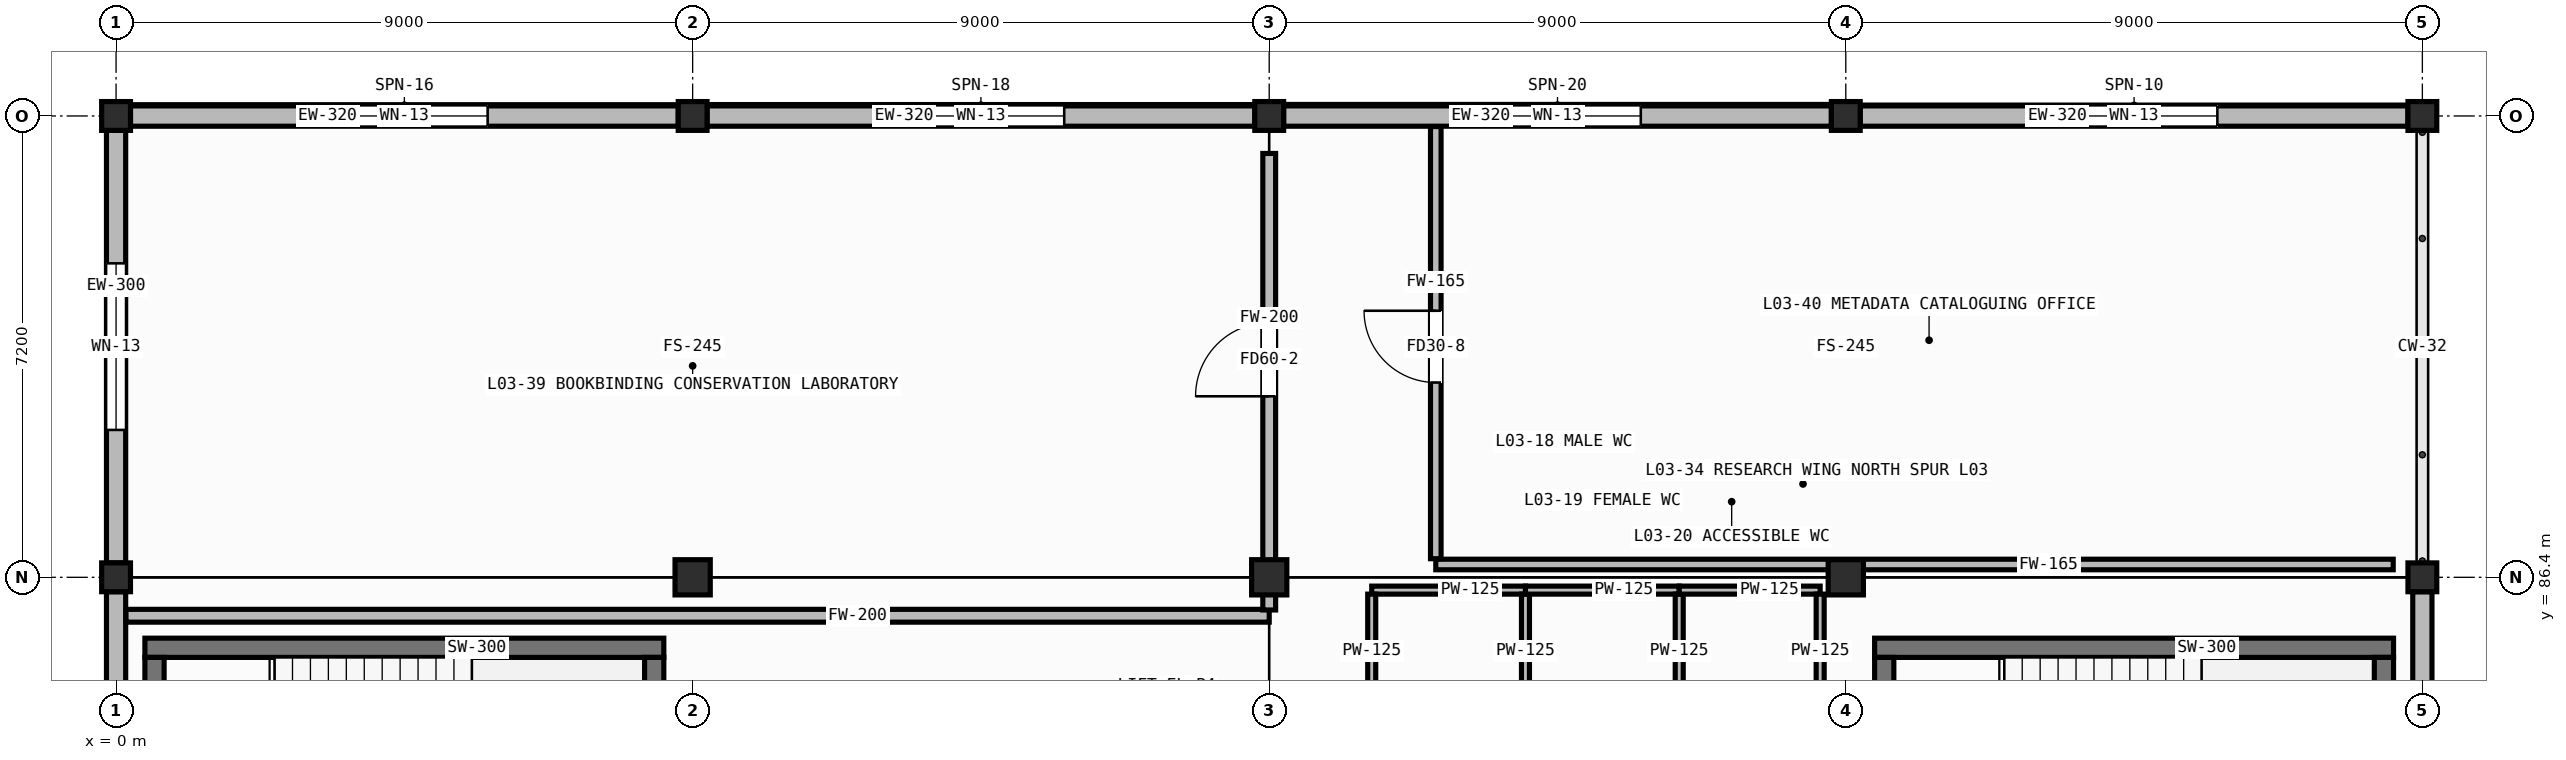
"""IFC4 building model, lengths in metres.
Left out: names, types, materials, properties, quantities, classifications, styles, units other than length and angle.
Written with IfcOpenShell. Run it as: python <this file> out.ifc"""

import sys

from ifc_helpers import new_model, si_unit, direction, frame, frame_2d, origin, origin_2d, place, context, subcontext, project, spatial, rectangle, hollow_rectangle, extrude, element, fill, save


model = new_model("IFC4")
c1 = context("Model", 3, precision=1e-05, world=origin(), true_north=direction((0.0, 1.0)))
c2 = subcontext(c1, "Body", "Model", "MODEL_VIEW")
j1 = project(units=[si_unit("LENGTHUNIT", "METRE"), si_unit("PLANEANGLEUNIT", "RADIAN")], contexts=[c1])
p1 = place(None, origin())
s1 = spatial("IfcSite", under=j1, at=p1, CompositionType="ELEMENT")
p2 = place(p1, origin())
s2 = spatial("IfcBuilding", under=s1, at=p2, CompositionType="ELEMENT")
p3 = place(p2, frame((0.0, 0.0, 8.8)))
s3 = spatial("IfcBuildingStorey", under=s2, at=p3, CompositionType="ELEMENT", Elevation=8.8)
for number, where, z_axis, x_axis in (
    (1, (0.0, 86.4, 0.0), (0.0, 0.0, 1.0), (1.0, 0.0, 0.0)),
    (2, (0.0, 93.6, 0.0), (0.0, 0.0, 1.0), (1.0, 0.0, 0.0)),
):
    element("IfcColumn", number, at=place(p3, frame(where, z_axis=z_axis, x_axis=x_axis)), inside=s3, PredefinedType="COLUMN", context=c2, shape_type="SweptSolid", body=[
        extrude(hollow_rectangle(XDim=0.45, YDim=0.45, WallThickness=0.019, at=origin_2d()), origin(), (0.0, 0.0, 1.0), 4.0),
    ])
p4 = place(p3, frame((9.0, 86.4, 0.0), z_axis=(0.0, 0.0, 1.0), x_axis=(1.0, 0.0, 0.0)))
e3 = element("IfcColumn", 3, at=p4, inside=s3, PredefinedType="COLUMN", context=c2, shape_type="SweptSolid", body=[
    extrude(hollow_rectangle(XDim=0.55, YDim=0.55, WallThickness=0.022, at=origin_2d()), origin(), (0.0, 0.0, 1.0), 4.0),
])
p5 = place(p3, frame((9.0, 93.6, 0.0), z_axis=(0.0, 0.0, 1.0), x_axis=(1.0, 0.0, 0.0)))
e4 = element("IfcColumn", 4, at=p5, inside=s3, PredefinedType="COLUMN", context=c2, shape_type="SweptSolid", body=[
    extrude(hollow_rectangle(XDim=0.45, YDim=0.45, WallThickness=0.019, at=origin_2d()), origin(), (0.0, 0.0, 1.0), 4.0),
])
p6 = place(p3, frame((18.0, 86.4, 0.0), z_axis=(0.0, 0.0, 1.0), x_axis=(1.0, 0.0, 0.0)))
e5 = element("IfcColumn", 5, at=p6, inside=s3, PredefinedType="COLUMN", context=c2, shape_type="SweptSolid", body=[
    extrude(hollow_rectangle(XDim=0.55, YDim=0.55, WallThickness=0.022, at=origin_2d()), origin(), (0.0, 0.0, 1.0), 4.0),
])
p7 = place(p3, frame((18.0, 93.6, 0.0), z_axis=(0.0, 0.0, 1.0), x_axis=(1.0, 0.0, 0.0)))
e6 = element("IfcColumn", 6, at=p7, inside=s3, PredefinedType="COLUMN", context=c2, shape_type="SweptSolid", body=[
    extrude(hollow_rectangle(XDim=0.45, YDim=0.45, WallThickness=0.019, at=origin_2d()), origin(), (0.0, 0.0, 1.0), 4.0),
])
p8 = place(p3, frame((27.0, 86.4, 0.0), z_axis=(0.0, 0.0, 1.0), x_axis=(1.0, 0.0, 0.0)))
e7 = element("IfcColumn", 7, at=p8, inside=s3, PredefinedType="COLUMN", context=c2, shape_type="SweptSolid", body=[
    extrude(hollow_rectangle(XDim=0.55, YDim=0.55, WallThickness=0.022, at=origin_2d()), origin(), (0.0, 0.0, 1.0), 4.0),
])
for number, where, z_axis, x_axis in (
    (8, (27.0, 93.6, 0.0), (0.0, 0.0, 1.0), (1.0, 0.0, 0.0)),
    (9, (36.0, 86.4, 0.0), (0.0, 0.0, 1.0), (1.0, 0.0, 0.0)),
    (10, (36.0, 93.6, 0.0), (0.0, 0.0, 1.0), (1.0, 0.0, 0.0)),
):
    element("IfcColumn", number, at=place(p3, frame(where, z_axis=z_axis, x_axis=x_axis)), inside=s3, PredefinedType="COLUMN", context=c2, shape_type="SweptSolid", body=[
        extrude(hollow_rectangle(XDim=0.45, YDim=0.45, WallThickness=0.019, at=origin_2d()), origin(), (0.0, 0.0, 1.0), 4.0),
    ])
p9 = place(p3, frame((8.775, 93.6, 0.0), z_axis=(0.0, 0.0, 1.0), x_axis=(-1.0, 0.0, 0.0)))
e11 = element("IfcWall", 11, at=p9, inside=s3, PredefinedType="STANDARD", context=c2, shape_type="SweptSolid", body=[
    extrude(rectangle(XDim=8.55, YDim=0.32, at=frame_2d((4.275, 0.0))), origin(), (0.0, 0.0, 1.0), 3.295),
])
p10 = place(p9, frame((2.975, 0.0, 0.85)))
e12 = element("IfcOpeningElement", 12, at=p10, cuts=e11, PredefinedType="OPENING", context=c2, shape_type="SweptSolid", body=[
    extrude(rectangle(XDim=2.6, YDim=1.6, at=frame_2d((1.3, 0.8))), frame((0.0, 0.172, 0.0), z_axis=(0.0, -1.0, 0.0), x_axis=(1.0, 0.0, 0.0)), (0.0, 0.0, 1.0), 0.344),
])
p11 = place(p3, frame((17.775, 93.6, 0.0), z_axis=(0.0, 0.0, 1.0), x_axis=(-1.0, 0.0, 0.0)))
e13 = element("IfcWall", 13, at=p11, inside=s3, PredefinedType="STANDARD", context=c2, shape_type="SweptSolid", body=[
    extrude(rectangle(XDim=8.55, YDim=0.32, at=frame_2d((4.275, 0.0))), origin(), (0.0, 0.0, 1.0), 3.295),
])
p12 = place(p11, frame((2.975, 0.0, 0.85)))
e14 = element("IfcOpeningElement", 14, at=p12, cuts=e13, PredefinedType="OPENING", context=c2, shape_type="SweptSolid", body=[
    extrude(rectangle(XDim=2.6, YDim=1.6, at=frame_2d((1.3, 0.8))), frame((0.0, 0.172, 0.0), z_axis=(0.0, -1.0, 0.0), x_axis=(1.0, 0.0, 0.0)), (0.0, 0.0, 1.0), 0.344),
])
p13 = place(p3, frame((26.775, 93.6, 0.0), z_axis=(0.0, 0.0, 1.0), x_axis=(-1.0, 0.0, 0.0)))
e15 = element("IfcWall", 15, at=p13, inside=s3, PredefinedType="STANDARD", context=c2, shape_type="SweptSolid", body=[
    extrude(rectangle(XDim=8.55, YDim=0.32, at=frame_2d((4.275, 0.0))), origin(), (0.0, 0.0, 1.0), 3.295),
])
p14 = place(p13, frame((2.975, 0.0, 0.85)))
e16 = element("IfcOpeningElement", 16, at=p14, cuts=e15, PredefinedType="OPENING", context=c2, shape_type="SweptSolid", body=[
    extrude(rectangle(XDim=2.6, YDim=1.6, at=frame_2d((1.3, 0.8))), frame((0.0, 0.172, 0.0), z_axis=(0.0, -1.0, 0.0), x_axis=(1.0, 0.0, 0.0)), (0.0, 0.0, 1.0), 0.344),
])
p15 = place(p3, frame((35.775, 93.6, 0.0), z_axis=(0.0, 0.0, 1.0), x_axis=(-1.0, 0.0, 0.0)))
e17 = element("IfcWall", 17, at=p15, inside=s3, PredefinedType="STANDARD", context=c2, shape_type="SweptSolid", body=[
    extrude(rectangle(XDim=8.55, YDim=0.32, at=frame_2d((4.275, 0.0))), origin(), (0.0, 0.0, 1.0), 3.295),
])
p16 = place(p15, frame((2.975, 0.0, 0.85)))
e18 = element("IfcOpeningElement", 18, at=p16, cuts=e17, PredefinedType="OPENING", context=c2, shape_type="SweptSolid", body=[
    extrude(rectangle(XDim=2.6, YDim=1.6, at=frame_2d((1.3, 0.8))), frame((0.0, 0.172, 0.0), z_axis=(0.0, -1.0, 0.0), x_axis=(1.0, 0.0, 0.0)), (0.0, 0.0, 1.0), 0.344),
])
p17 = place(p3, frame((0.0, 79.425, 0.0), z_axis=(0.0, 0.0, 1.0), x_axis=(0.0, 1.0, 0.0)))
e19 = element("IfcWall", 19, at=p17, inside=s3, PredefinedType="STANDARD", context=c2, shape_type="SweptSolid", body=[
    extrude(rectangle(XDim=6.75, YDim=0.3, at=frame_2d((3.375, 0.0))), origin(), (0.0, 0.0, 1.0), 3.295),
])
p18 = place(p3, frame((0.0, 86.625, 0.0), z_axis=(0.0, 0.0, 1.0), x_axis=(0.0, 1.0, 0.0)))
e20 = element("IfcWall", 20, at=p18, inside=s3, PredefinedType="STANDARD", context=c2, shape_type="SweptSolid", body=[
    extrude(rectangle(XDim=6.75, YDim=0.3, at=frame_2d((3.375, 0.0))), origin(), (0.0, 0.0, 1.0), 3.295),
])
p19 = place(p18, frame((2.075, 0.0, 0.85)))
e21 = element("IfcOpeningElement", 21, at=p19, cuts=e20, PredefinedType="OPENING", context=c2, shape_type="SweptSolid", body=[
    extrude(rectangle(XDim=2.6, YDim=1.6, at=frame_2d((1.3, 0.8))), frame((0.0, 0.162, 0.0), z_axis=(0.0, -1.0, 0.0), x_axis=(1.0, 0.0, 0.0)), (0.0, 0.0, 1.0), 0.324),
])
p20 = place(p3, frame((36.0, 86.175, 0.0), z_axis=(0.0, 0.0, 1.0), x_axis=(0.0, -1.0, 0.0)))
e22 = element("IfcWall", 22, at=p20, inside=s3, PredefinedType="STANDARD", context=c2, shape_type="SweptSolid", body=[
    extrude(rectangle(XDim=6.75, YDim=0.3, at=frame_2d((3.375, 0.0))), origin(), (0.0, 0.0, 1.0), 3.295),
])
p21 = place(p3, frame((0.45, 85.3, 0.0), z_axis=(0.0, 0.0, 1.0), x_axis=(1.0, 0.0, 0.0)))
e23 = element("IfcWall", 23, at=p21, inside=s3, PredefinedType="SHEAR", context=c2, shape_type="SweptSolid", body=[
    extrude(rectangle(XDim=8.1, YDim=0.3, at=frame_2d((4.05, 0.0))), origin(), (0.0, 0.0, 1.0), 3.745),
])
for number, where, z_axis, x_axis in (
    (24, (0.6, 81.35, 0.0), (0.0, 0.0, 1.0), (0.0, 1.0, 0.0)),
    (25, (8.4, 81.35, 0.0), (0.0, 0.0, 1.0), (0.0, 1.0, 0.0)),
):
    element("IfcWall", number, at=place(p3, frame(where, z_axis=z_axis, x_axis=x_axis)), inside=s3, PredefinedType="SHEAR", context=c2, shape_type="SweptSolid", body=[
        extrude(rectangle(XDim=3.8, YDim=0.3, at=frame_2d((1.9, 0.0))), origin(), (0.0, 0.0, 1.0), 3.745),
    ])
p22 = place(p3, frame((27.45, 85.3, 0.0), z_axis=(0.0, 0.0, 1.0), x_axis=(1.0, 0.0, 0.0)))
e26 = element("IfcWall", 26, at=p22, inside=s3, PredefinedType="SHEAR", context=c2, shape_type="SweptSolid", body=[
    extrude(rectangle(XDim=8.1, YDim=0.3, at=frame_2d((4.05, 0.0))), origin(), (0.0, 0.0, 1.0), 3.745),
])
for number, where, z_axis, x_axis in (
    (27, (27.6, 81.35, 0.0), (0.0, 0.0, 1.0), (0.0, 1.0, 0.0)),
    (28, (35.4, 81.35, 0.0), (0.0, 0.0, 1.0), (0.0, 1.0, 0.0)),
):
    element("IfcWall", number, at=place(p3, frame(where, z_axis=z_axis, x_axis=x_axis)), inside=s3, PredefinedType="SHEAR", context=c2, shape_type="SweptSolid", body=[
        extrude(rectangle(XDim=3.8, YDim=0.3, at=frame_2d((1.9, 0.0))), origin(), (0.0, 0.0, 1.0), 3.745),
    ])
p23 = place(p3, frame((19.6, 86.2, 0.0), z_axis=(0.0, 0.0, 1.0), x_axis=(1.0, 0.0, 0.0)))
e29 = element("IfcWall", 29, at=p23, inside=s3, PredefinedType="PARTITIONING", context=c2, shape_type="SweptSolid", body=[
    extrude(rectangle(XDim=2.4, YDim=0.125, at=frame_2d((1.2, 0.0))), origin(), (0.0, 0.0, 1.0), 3.025),
])
for number, where, z_axis, x_axis in (
    (30, (19.6, 83.69, 0.0), (0.0, 0.0, 1.0), (0.0, 1.0, 0.0)),
    (31, (22.0, 83.69, 0.0), (0.0, 0.0, 1.0), (0.0, 1.0, 0.0)),
):
    element("IfcWall", number, at=place(p3, frame(where, z_axis=z_axis, x_axis=x_axis)), inside=s3, PredefinedType="PARTITIONING", context=c2, shape_type="SweptSolid", body=[
        extrude(rectangle(XDim=2.448, YDim=0.125, at=frame_2d((1.224, 0.0))), origin(), (0.0, 0.0, 1.0), 3.745),
    ])
p24 = place(p3, frame((22.0, 86.2, 0.0), z_axis=(0.0, 0.0, 1.0), x_axis=(1.0, 0.0, 0.0)))
e32 = element("IfcWall", 32, at=p24, inside=s3, PredefinedType="PARTITIONING", context=c2, shape_type="SweptSolid", body=[
    extrude(rectangle(XDim=2.4, YDim=0.125, at=frame_2d((1.2, 0.0))), origin(), (0.0, 0.0, 1.0), 3.025),
])
p25 = place(p3, frame((24.4, 83.69, 0.0), z_axis=(0.0, 0.0, 1.0), x_axis=(0.0, 1.0, 0.0)))
e33 = element("IfcWall", 33, at=p25, inside=s3, PredefinedType="PARTITIONING", context=c2, shape_type="SweptSolid", body=[
    extrude(rectangle(XDim=2.448, YDim=0.125, at=frame_2d((1.224, 0.0))), origin(), (0.0, 0.0, 1.0), 3.745),
])
p26 = place(p3, frame((24.4, 86.2, 0.0), z_axis=(0.0, 0.0, 1.0), x_axis=(1.0, 0.0, 0.0)))
e34 = element("IfcWall", 34, at=p26, inside=s3, PredefinedType="PARTITIONING", context=c2, shape_type="SweptSolid", body=[
    extrude(rectangle(XDim=2.2, YDim=0.125, at=frame_2d((1.1, 0.0))), origin(), (0.0, 0.0, 1.0), 3.025),
])
p27 = place(p3, frame((26.6, 83.69, 0.0), z_axis=(0.0, 0.0, 1.0), x_axis=(0.0, 1.0, 0.0)))
e35 = element("IfcWall", 35, at=p27, inside=s3, PredefinedType="PARTITIONING", context=c2, shape_type="SweptSolid", body=[
    extrude(rectangle(XDim=2.448, YDim=0.125, at=frame_2d((1.224, 0.0))), origin(), (0.0, 0.0, 1.0), 3.745),
])
p28 = place(p3, frame((0.155, 85.8, 0.0), z_axis=(0.0, 0.0, 1.0), x_axis=(1.0, 0.0, 0.0)))
e36 = element("IfcWall", 36, at=p28, inside=s3, PredefinedType="PARTITIONING", context=c2, shape_type="SweptSolid", body=[
    extrude(rectangle(XDim=17.845, YDim=0.2, at=frame_2d((8.922, 0.0))), origin(), (0.0, 0.0, 1.0), 3.745),
])
p29 = place(p3, frame((18.0, 85.89, 0.0), z_axis=(0.0, 0.0, 1.0), x_axis=(0.0, 1.0, 0.0)))
e37 = element("IfcWall", 37, at=p29, inside=s3, PredefinedType="PARTITIONING", context=c2, shape_type="SweptSolid", body=[
    extrude(rectangle(XDim=7.125, YDim=0.2, at=frame_2d((3.562, 0.0))), origin(), (0.0, 0.0, 1.0), 3.025),
])
p30 = place(p29, frame((3.335, 0.0, 0.0)))
e38 = element("IfcOpeningElement", 38, at=p30, cuts=e37, PredefinedType="OPENING", context=c2, shape_type="SweptSolid", body=[
    extrude(rectangle(XDim=1.15, YDim=2.1, at=frame_2d((0.575, 1.05))), frame((0.0, 0.112, 0.0), z_axis=(0.0, -1.0, 0.0), x_axis=(1.0, 0.0, 0.0)), (0.0, 0.0, 1.0), 0.224),
])
p31 = place(p3, frame((20.6, 86.6, 0.0), z_axis=(0.0, 0.0, 1.0), x_axis=(1.0, 0.0, 0.0)))
e39 = element("IfcWall", 39, at=p31, inside=s3, PredefinedType="PARTITIONING", context=c2, shape_type="SweptSolid", body=[
    extrude(rectangle(XDim=14.945, YDim=0.165, at=frame_2d((7.472, 0.0))), origin(), (0.0, 0.0, 1.0), 3.025),
])
p32 = place(p3, frame((20.6, 86.69, 0.0), z_axis=(0.0, 0.0, 1.0), x_axis=(0.0, 1.0, 0.0)))
e40 = element("IfcWall", 40, at=p32, inside=s3, PredefinedType="PARTITIONING", context=c2, shape_type="SweptSolid", body=[
    extrude(rectangle(XDim=6.745, YDim=0.165, at=frame_2d((3.373, 0.0))), origin(), (0.0, 0.0, 1.0), 3.745),
])
p33 = place(p32, frame((2.75, 0.0, 0.0)))
e41 = element("IfcOpeningElement", 41, at=p33, cuts=e40, PredefinedType="OPENING", context=c2, shape_type="SweptSolid", body=[
    extrude(rectangle(XDim=1.12, YDim=2.08, at=frame_2d((0.56, 1.04))), frame((0.0, 0.094, 0.0), z_axis=(0.0, -1.0, 0.0), x_axis=(1.0, 0.0, 0.0)), (0.0, 0.0, 1.0), 0.189),
])
p34 = place(p10, origin())
e42 = element("IfcWindow", 42, at=p34, inside=s3, PartitioningType="DOUBLE_PANEL_VERTICAL", PredefinedType="WINDOW", context=c2, shape_type="SweptSolid", body=[
    extrude(rectangle(XDim=2.6, YDim=1.6, at=frame_2d((1.3, 0.8))), frame((0.0, 0.03, 0.0), z_axis=(0.0, -1.0, 0.0), x_axis=(1.0, 0.0, 0.0)), (0.0, 0.0, 1.0), 0.06),
])
fill(e12, e42)
p35 = place(p12, origin())
e43 = element("IfcWindow", 43, at=p35, inside=s3, PartitioningType="DOUBLE_PANEL_VERTICAL", PredefinedType="WINDOW", context=c2, shape_type="SweptSolid", body=[
    extrude(rectangle(XDim=2.6, YDim=1.6, at=frame_2d((1.3, 0.8))), frame((0.0, 0.03, 0.0), z_axis=(0.0, -1.0, 0.0), x_axis=(1.0, 0.0, 0.0)), (0.0, 0.0, 1.0), 0.06),
])
fill(e14, e43)
p36 = place(p14, origin())
e44 = element("IfcWindow", 44, at=p36, inside=s3, PartitioningType="DOUBLE_PANEL_VERTICAL", PredefinedType="WINDOW", context=c2, shape_type="SweptSolid", body=[
    extrude(rectangle(XDim=2.6, YDim=1.6, at=frame_2d((1.3, 0.8))), frame((0.0, 0.03, 0.0), z_axis=(0.0, -1.0, 0.0), x_axis=(1.0, 0.0, 0.0)), (0.0, 0.0, 1.0), 0.06),
])
fill(e16, e44)
p37 = place(p16, origin())
e45 = element("IfcWindow", 45, at=p37, inside=s3, PartitioningType="DOUBLE_PANEL_VERTICAL", PredefinedType="WINDOW", context=c2, shape_type="SweptSolid", body=[
    extrude(rectangle(XDim=2.6, YDim=1.6, at=frame_2d((1.3, 0.8))), frame((0.0, 0.03, 0.0), z_axis=(0.0, -1.0, 0.0), x_axis=(1.0, 0.0, 0.0)), (0.0, 0.0, 1.0), 0.06),
])
fill(e18, e45)
p38 = place(p19, origin())
e46 = element("IfcWindow", 46, at=p38, inside=s3, PartitioningType="DOUBLE_PANEL_VERTICAL", PredefinedType="WINDOW", context=c2, shape_type="SweptSolid", body=[
    extrude(rectangle(XDim=2.6, YDim=1.6, at=frame_2d((1.3, 0.8))), frame((0.0, 0.03, 0.0), z_axis=(0.0, -1.0, 0.0), x_axis=(1.0, 0.0, 0.0)), (0.0, 0.0, 1.0), 0.06),
])
fill(e21, e46)
p39 = place(p30, origin())
e47 = element("IfcDoor", 47, at=p39, inside=s3, OperationType="SINGLE_SWING_LEFT", PredefinedType="DOOR", context=c2, shape_type="SweptSolid", body=[
    extrude(rectangle(XDim=1.15, YDim=2.1, at=frame_2d((0.575, 1.05))), frame((0.0, 0.025, 0.0), z_axis=(0.0, -1.0, 0.0), x_axis=(1.0, 0.0, 0.0)), (0.0, 0.0, 1.0), 0.05),
])
fill(e38, e47)
p40 = place(p33, origin())
e48 = element("IfcDoor", 48, at=p40, inside=s3, OperationType="SINGLE_SWING_RIGHT", PredefinedType="DOOR", context=c2, shape_type="SweptSolid", body=[
    extrude(rectangle(XDim=1.12, YDim=2.08, at=frame_2d((0.56, 1.04))), frame((0.0, 0.025, 0.0), z_axis=(0.0, -1.0, 0.0), x_axis=(1.0, 0.0, 0.0)), (0.0, 0.0, 1.0), 0.05),
])
fill(e41, e48)
save(model, sys.argv[1])
